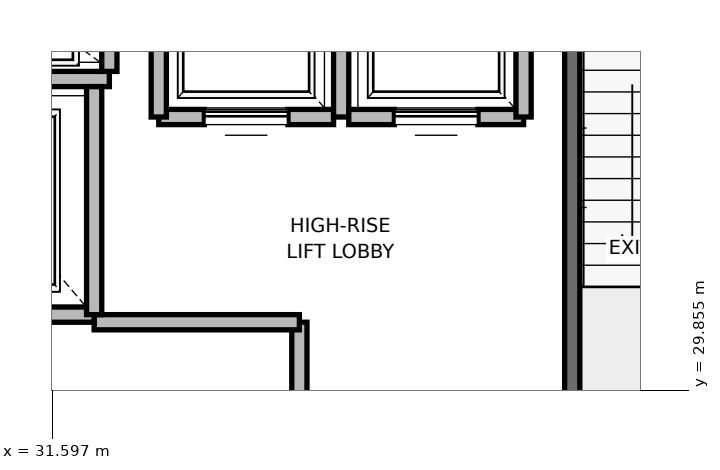
"""IFC4 building model, lengths in metres.
Left out: names, types, materials, properties, quantities, classifications, styles, units other than length and angle.
Written with IfcOpenShell. Run it as: python <this file> out.ifc"""

import sys

from ifc_helpers import new_model, si_unit, direction, frame, frame_2d, origin, place, context, subcontext, project, spatial, rectangle, extrude, element, fill, save


model = new_model("IFC4")
c1 = context("Model", 3, precision=1e-05, world=origin(), true_north=direction((0.0, 1.0)))
c2 = subcontext(c1, "Body", "Model", "MODEL_VIEW")
j1 = project(units=[si_unit("LENGTHUNIT", "METRE"), si_unit("PLANEANGLEUNIT", "RADIAN")], contexts=[c1])
p1 = place(None, origin())
s1 = spatial("IfcSite", under=j1, at=p1, CompositionType="ELEMENT")
p2 = place(p1, origin())
s2 = spatial("IfcBuilding", under=s1, at=p2, CompositionType="ELEMENT")
p3 = place(p2, frame((0.0, 0.0, 334.8)))
s3 = spatial("IfcBuildingStorey", under=s2, at=p3, CompositionType="ELEMENT", Elevation=334.8)
p4 = place(p3, frame((38.44, 27.38, 0.0), z_axis=(0.0, 0.0, 1.0), x_axis=(0.0, 1.0, 0.0)))
e1 = element("IfcWall", 1, at=p4, inside=s3, PredefinedType="SOLIDWALL", context=c2, shape_type="SweptSolid", body=[
    extrude(rectangle(XDim=8.87, YDim=0.2, at=frame_2d((4.435, 0.0))), origin(), (0.0, 0.0, 1.0), 3.785),
])
p5 = place(p3, frame((34.85, 27.38, 0.0), z_axis=(0.0, 0.0, 1.0), x_axis=(0.0, 1.0, 0.0)))
e2 = element("IfcWall", 2, at=p5, inside=s3, PredefinedType="PARTITIONING", context=c2, shape_type="SweptSolid", body=[
    extrude(rectangle(XDim=3.37, YDim=0.2, at=frame_2d((1.685, 0.0))), origin(), (0.0, 0.0, 1.0), 3.785),
])
p6 = place(p5, frame((1.11, 0.0, 0.0)))
e3 = element("IfcOpeningElement", 3, at=p6, cuts=e2, PredefinedType="OPENING", context=c2, shape_type="SweptSolid", body=[
    extrude(rectangle(XDim=1.15, YDim=2.2, at=frame_2d((0.575, 1.1))), frame((0.0, 0.1, 0.0), z_axis=(0.0, -1.0, 0.0), x_axis=(1.0, 0.0, 0.0)), (0.0, 0.0, 1.0), 0.2),
])
p7 = place(p3, frame((32.15, 30.75, 0.0), z_axis=(0.0, 0.0, 1.0), x_axis=(1.0, 0.0, 0.0)))
e4 = element("IfcWall", 4, at=p7, inside=s3, PredefinedType="PARTITIONING", context=c2, shape_type="SweptSolid", body=[
    extrude(rectangle(XDim=2.7, YDim=0.2, at=frame_2d((1.35, 0.0))), origin(), (0.0, 0.0, 1.0), 3.785),
])
p8 = place(p3, frame((29.55, 30.85, 0.0), z_axis=(0.0, 0.0, 1.0), x_axis=(1.0, 0.0, 0.0)))
e5 = element("IfcWall", 5, at=p8, inside=s3, PredefinedType="SOLIDWALL", context=c2, shape_type="SweptSolid", body=[
    extrude(rectangle(XDim=2.6, YDim=0.2, at=frame_2d((1.3, 0.0))), origin(), (0.0, 0.0, 1.0), 2.865),
])
p9 = place(p8, frame((0.75, 0.0, 0.0)))
e6 = element("IfcOpeningElement", 6, at=p9, cuts=e5, PredefinedType="OPENING", context=c2, shape_type="SweptSolid", body=[
    extrude(rectangle(XDim=1.1, YDim=2.2, at=frame_2d((0.55, 1.1))), frame((0.0, 0.1, 0.0), z_axis=(0.0, -1.0, 0.0), x_axis=(1.0, 0.0, 0.0)), (0.0, 0.0, 1.0), 0.2),
])
p10 = place(p3, frame((29.55, 33.95, 0.0), z_axis=(0.0, 0.0, 1.0), x_axis=(1.0, 0.0, 0.0)))
e7 = element("IfcWall", 7, at=p10, inside=s3, PredefinedType="SOLIDWALL", context=c2, shape_type="SweptSolid", body=[
    extrude(rectangle(XDim=2.8, YDim=0.2, at=frame_2d((1.4, 0.0))), origin(), (0.0, 0.0, 1.0), 3.785),
])
p11 = place(p3, frame((32.15, 30.85, 0.0), z_axis=(0.0, 0.0, 1.0), x_axis=(0.0, 1.0, 0.0)))
e8 = element("IfcWall", 8, at=p11, inside=s3, PredefinedType="SOLIDWALL", context=c2, shape_type="SweptSolid", body=[
    extrude(rectangle(XDim=3.0, YDim=0.2, at=frame_2d((1.5, 0.0))), origin(), (0.0, 0.0, 1.0), 3.785),
])
p12 = place(p3, frame((32.35, 34.05, 0.0), z_axis=(0.0, 0.0, 1.0), x_axis=(0.0, 1.0, 0.0)))
e9 = element("IfcWall", 9, at=p12, inside=s3, PredefinedType="SOLIDWALL", context=c2, shape_type="SweptSolid", body=[
    extrude(rectangle(XDim=2.1, YDim=0.2, at=frame_2d((1.05, 0.0))), origin(), (0.0, 0.0, 1.0), 3.785),
])
p13 = place(p12, frame((0.5, 0.0, 0.0)))
e10 = element("IfcOpeningElement", 10, at=p13, cuts=e9, PredefinedType="OPENING", context=c2, shape_type="SweptSolid", body=[
    extrude(rectangle(XDim=1.1, YDim=2.2, at=frame_2d((0.55, 1.1))), frame((0.0, 0.1, 0.0), z_axis=(0.0, -1.0, 0.0), x_axis=(1.0, 0.0, 0.0)), (0.0, 0.0, 1.0), 0.2),
])
p14 = place(p3, frame((33.0, 33.45, 0.0), z_axis=(0.0, 0.0, 1.0), x_axis=(1.0, 0.0, 0.0)))
e11 = element("IfcWall", 11, at=p14, inside=s3, PredefinedType="SOLIDWALL", context=c2, shape_type="SweptSolid", body=[
    extrude(rectangle(XDim=2.3, YDim=0.2, at=frame_2d((1.15, 0.0))), origin(), (0.0, 0.0, 1.0), 3.785),
])
p15 = place(p14, frame((0.6, 0.0, 0.0)))
e12 = element("IfcOpeningElement", 12, at=p15, cuts=e11, PredefinedType="OPENING", context=c2, shape_type="SweptSolid", body=[
    extrude(rectangle(XDim=1.1, YDim=2.2, at=frame_2d((0.55, 1.1))), frame((0.0, 0.1, 0.0), z_axis=(0.0, -1.0, 0.0), x_axis=(1.0, 0.0, 0.0)), (0.0, 0.0, 1.0), 0.2),
])
p16 = place(p3, frame((33.0, 36.05, 0.0), z_axis=(0.0, 0.0, 1.0), x_axis=(0.0, -1.0, 0.0)))
e13 = element("IfcWall", 13, at=p16, inside=s3, PredefinedType="SOLIDWALL", context=c2, shape_type="SweptSolid", body=[
    extrude(rectangle(XDim=2.6, YDim=0.2, at=frame_2d((1.3, 0.0))), origin(), (0.0, 0.0, 1.0), 3.785),
])
p17 = place(p3, frame((35.4, 33.45, 0.0), z_axis=(0.0, 0.0, 1.0), x_axis=(0.0, 1.0, 0.0)))
e14 = element("IfcWall", 14, at=p17, inside=s3, PredefinedType="SOLIDWALL", context=c2, shape_type="SweptSolid", body=[
    extrude(rectangle(XDim=2.6, YDim=0.2, at=frame_2d((1.3, 0.0))), origin(), (0.0, 0.0, 1.0), 2.865),
])
p18 = place(p3, frame((35.5, 33.45, 0.0), z_axis=(0.0, 0.0, 1.0), x_axis=(1.0, 0.0, 0.0)))
e15 = element("IfcWall", 15, at=p18, inside=s3, PredefinedType="SOLIDWALL", context=c2, shape_type="SweptSolid", body=[
    extrude(rectangle(XDim=2.3, YDim=0.2, at=frame_2d((1.15, 0.0))), origin(), (0.0, 0.0, 1.0), 3.785),
])
p19 = place(p18, frame((0.6, 0.0, 0.0)))
e16 = element("IfcOpeningElement", 16, at=p19, cuts=e15, PredefinedType="OPENING", context=c2, shape_type="SweptSolid", body=[
    extrude(rectangle(XDim=1.1, YDim=2.2, at=frame_2d((0.55, 1.1))), frame((0.0, 0.1, 0.0), z_axis=(0.0, -1.0, 0.0), x_axis=(1.0, 0.0, 0.0)), (0.0, 0.0, 1.0), 0.2),
])
p20 = place(p3, frame((37.8, 33.45, 0.0), z_axis=(0.0, 0.0, 1.0), x_axis=(0.0, 1.0, 0.0)))
e17 = element("IfcWall", 17, at=p20, inside=s3, PredefinedType="SOLIDWALL", context=c2, shape_type="SweptSolid", body=[
    extrude(rectangle(XDim=2.6, YDim=0.2, at=frame_2d((1.3, 0.0))), origin(), (0.0, 0.0, 1.0), 2.865),
])
p21 = place(p15, origin())
e18 = element("IfcDoor", 18, at=p21, inside=s3, OperationType="SLIDING_TO_RIGHT", PredefinedType="DOOR", context=c2, shape_type="SweptSolid", body=[
    extrude(rectangle(XDim=1.1, YDim=2.2, at=frame_2d((0.55, 1.1))), frame((0.0, 0.025, 0.0), z_axis=(0.0, -1.0, 0.0), x_axis=(1.0, 0.0, 0.0)), (0.0, 0.0, 1.0), 0.05),
])
fill(e12, e18)
p22 = place(p19, origin())
e19 = element("IfcDoor", 19, at=p22, inside=s3, OperationType="SLIDING_TO_RIGHT", PredefinedType="DOOR", context=c2, shape_type="SweptSolid", body=[
    extrude(rectangle(XDim=1.1, YDim=2.2, at=frame_2d((0.55, 1.1))), frame((0.0, 0.025, 0.0), z_axis=(0.0, -1.0, 0.0), x_axis=(1.0, 0.0, 0.0)), (0.0, 0.0, 1.0), 0.05),
])
fill(e16, e19)
save(model, sys.argv[1])
